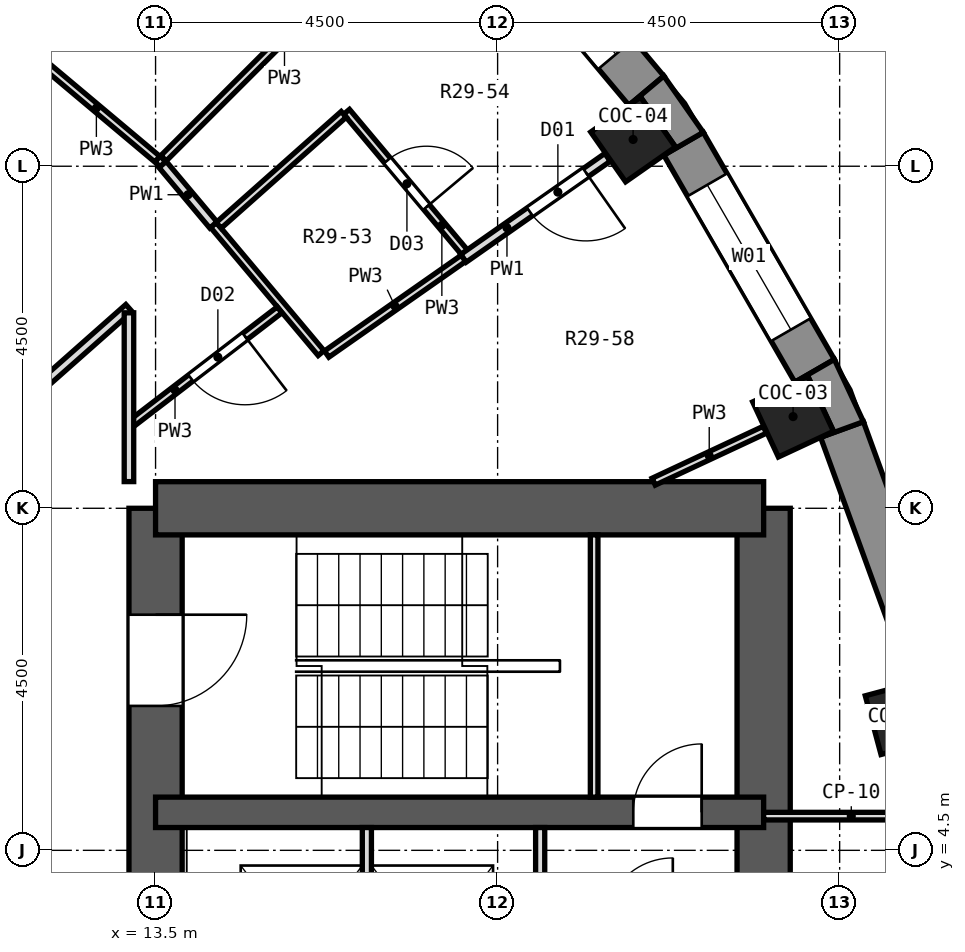
"""IFC4 building model, lengths in metres.
Left out: names, types, materials, properties, quantities, classifications, styles, units other than length and angle.
Written with IfcOpenShell. Run it as: python <this file> out.ifc"""

import sys

from ifc_helpers import new_model, si_unit, direction, frame, frame_2d, origin, origin_2d, place, context, subcontext, project, spatial, polyline, rectangle, outline, extrude, element, fill, save


model = new_model("IFC4")
c1 = context("Model", 3, precision=1e-05, world=origin(), true_north=direction((0.0, 1.0)))
c2 = subcontext(c1, "Body", "Model", "MODEL_VIEW")
j1 = project(units=[si_unit("LENGTHUNIT", "METRE"), si_unit("PLANEANGLEUNIT", "RADIAN")], contexts=[c1])
p1 = place(None, origin())
s1 = spatial("IfcSite", under=j1, at=p1, CompositionType="ELEMENT")
p2 = place(p1, origin())
s2 = spatial("IfcBuilding", under=s1, at=p2, CompositionType="ELEMENT")
p3 = place(p2, frame((0.0, 0.0, 200.4)))
s3 = spatial("IfcBuildingStorey", under=s2, at=p3, CompositionType="ELEMENT", Elevation=200.4)
for number, where, z_axis, x_axis in (
    (1, (23.327, 6.25, 0.0), (0.0, 0.0, 1.0), (0.966, 0.259, 0.0)),
    (2, (21.887, 10.206, 0.0), (0.0, 0.0, 1.0), (0.906, 0.423, 0.0)),
    (3, (19.782, 13.852, 0.0), (0.0, 0.0, 1.0), (0.819, 0.574, 0.0)),
):
    element("IfcColumn", number, at=place(p3, frame(where, z_axis=z_axis, x_axis=x_axis)), inside=s3, PredefinedType="COLUMN", context=c2, shape_type="SweptSolid", body=[
        extrude(rectangle(XDim=0.8, YDim=0.8, at=origin_2d()), origin(), (0.0, 0.0, 1.0), 3.3),
    ])
p4 = place(p3, frame((13.5, -9.0, 0.0), z_axis=(0.0, 0.0, 1.0), x_axis=(0.0, 1.0, 0.0)))
e4 = element("IfcWall", 4, at=p4, inside=s3, PredefinedType="SHEAR", context=c2, shape_type="SweptSolid", body=[
    extrude(rectangle(XDim=18.0, YDim=0.7, at=frame_2d((9.0, 0.0))), origin(), (0.0, 0.0, 1.0), 3.3),
])
p5 = place(p4, frame((15.4, 0.0, 0.0)))
e5 = element("IfcOpeningElement", 5, at=p5, cuts=e4, PredefinedType="OPENING", context=c2, shape_type="SweptSolid", body=[
    extrude(rectangle(XDim=1.2, YDim=2.1, at=frame_2d((0.6, 1.05))), frame((0.0, 0.362, 0.0), z_axis=(0.0, -1.0, 0.0), x_axis=(1.0, 0.0, 0.0)), (0.0, 0.0, 1.0), 0.724),
])
p6 = place(p4, frame((1.4, 0.0, 0.0)))
e6 = element("IfcOpeningElement", 6, at=p6, cuts=e4, PredefinedType="OPENING", context=c2, shape_type="SweptSolid", body=[
    extrude(rectangle(XDim=1.2, YDim=2.1, at=frame_2d((0.6, 1.05))), frame((0.0, 0.362, 0.0), z_axis=(0.0, -1.0, 0.0), x_axis=(1.0, 0.0, 0.0)), (0.0, 0.0, 1.0), 0.724),
])
p7 = place(p4, frame((7.5, 0.0, 0.0)))
e7 = element("IfcOpeningElement", 7, at=p7, cuts=e4, PredefinedType="OPENING", context=c2, shape_type="SweptSolid", body=[
    extrude(rectangle(XDim=3.0, YDim=2.4, at=frame_2d((1.5, 1.2))), frame((0.0, 0.362, 0.0), z_axis=(0.0, -1.0, 0.0), x_axis=(1.0, 0.0, 0.0)), (0.0, 0.0, 1.0), 0.724),
])
p8 = place(p3, frame((21.5, -9.0, 0.0), z_axis=(0.0, 0.0, 1.0), x_axis=(0.0, 1.0, 0.0)))
e8 = element("IfcWall", 8, at=p8, inside=s3, PredefinedType="SHEAR", context=c2, shape_type="SweptSolid", body=[
    extrude(rectangle(XDim=18.0, YDim=0.7, at=frame_2d((9.0, 0.0))), origin(), (0.0, 0.0, 1.0), 3.3),
])
p9 = place(p8, frame((9.45, 0.0, 0.0)))
e9 = element("IfcOpeningElement", 9, at=p9, cuts=e8, PredefinedType="OPENING", context=c2, shape_type="SweptSolid", body=[
    extrude(rectangle(XDim=0.9, YDim=2.1, at=frame_2d((0.45, 1.05))), frame((0.0, 0.362, 0.0), z_axis=(0.0, -1.0, 0.0), x_axis=(1.0, 0.0, 0.0)), (0.0, 0.0, 1.0), 0.724),
])
p10 = place(p8, frame((7.65, 0.0, 0.0)))
e10 = element("IfcOpeningElement", 10, at=p10, cuts=e8, PredefinedType="OPENING", context=c2, shape_type="SweptSolid", body=[
    extrude(rectangle(XDim=0.9, YDim=2.1, at=frame_2d((0.45, 1.05))), frame((0.0, 0.362, 0.0), z_axis=(0.0, -1.0, 0.0), x_axis=(1.0, 0.0, 0.0)), (0.0, 0.0, 1.0), 0.724),
])
p11 = place(p3, frame((13.5, 9.0, 0.0), z_axis=(0.0, 0.0, 1.0), x_axis=(1.0, 0.0, 0.0)))
e11 = element("IfcWall", 11, at=p11, inside=s3, PredefinedType="SHEAR", context=c2, shape_type="SweptSolid", body=[
    extrude(rectangle(XDim=8.0, YDim=0.7, at=frame_2d((4.0, 0.0))), origin(), (0.0, 0.0, 1.0), 3.3),
])
p12 = place(p3, frame((13.5, 5.0, 0.0), z_axis=(0.0, 0.0, 1.0), x_axis=(1.0, 0.0, 0.0)))
e12 = element("IfcWall", 12, at=p12, inside=s3, PredefinedType="SHEAR", context=c2, shape_type="SweptSolid", body=[
    extrude(rectangle(XDim=8.0, YDim=0.4, at=frame_2d((4.0, 0.0))), origin(), (0.0, 0.0, 1.0), 3.3),
])
p13 = place(p12, frame((6.285, 0.0, 0.0)))
e13 = element("IfcOpeningElement", 13, at=p13, cuts=e12, PredefinedType="OPENING", context=c2, shape_type="SweptSolid", body=[
    extrude(rectangle(XDim=0.9, YDim=2.1, at=frame_2d((0.45, 1.05))), frame((0.0, 0.212, 0.0), z_axis=(0.0, -1.0, 0.0), x_axis=(1.0, 0.0, 0.0)), (0.0, 0.0, 1.0), 0.424),
])
p14 = place(p3, frame((23.711, 6.794, 0.0), z_axis=(0.0, 0.0, 1.0), x_axis=(-0.342032843455, 0.93968799822, 0.0)))
e14 = element("IfcWall", 14, at=p14, inside=s3, PredefinedType="SOLIDWALL", context=c2, shape_type="SweptSolid", body=[
    extrude(rectangle(XDim=3.45, YDim=0.6, at=frame_2d((1.725, 0.0))), origin(), (0.0, 0.0, 1.0), 2.85),
])
p15 = place(p3, frame((22.171, 10.809, 0.0), z_axis=(0.0, 0.0, 1.0), x_axis=(-0.499998129301, 0.86602648383, 0.0)))
e15 = element("IfcWall", 15, at=p15, inside=s3, PredefinedType="SOLIDWALL", context=c2, shape_type="SweptSolid", body=[
    extrude(rectangle(XDim=3.45, YDim=0.6, at=frame_2d((1.725, 0.0))), origin(), (0.0, 0.0, 1.0), 2.85),
])
p16 = place(p15, frame((0.625, 0.0, 0.9)))
e16 = element("IfcOpeningElement", 16, at=p16, cuts=e15, PredefinedType="OPENING", context=c2, shape_type="SweptSolid", body=[
    extrude(rectangle(XDim=2.2, YDim=1.8, at=frame_2d((1.1, 0.9))), frame((0.0, 0.312, 0.0), z_axis=(0.0, -1.0, 0.0), x_axis=(1.0, 0.0, 0.0)), (0.0, 0.0, 1.0), 0.624),
])
p17 = place(p3, frame((19.957, 14.494, 0.0), z_axis=(0.0, 0.0, 1.0), x_axis=(-0.642770398358, 0.766058884809, 0.0)))
e17 = element("IfcWall", 17, at=p17, inside=s3, PredefinedType="SOLIDWALL", context=c2, shape_type="SweptSolid", body=[
    extrude(rectangle(XDim=3.449, YDim=0.6, at=frame_2d((1.725, 0.0))), origin(), (0.0, 0.0, 1.0), 2.85),
])
p18 = place(p17, frame((0.625, 0.0, 0.9)))
e18 = element("IfcOpeningElement", 18, at=p18, cuts=e17, PredefinedType="OPENING", context=c2, shape_type="SweptSolid", body=[
    extrude(rectangle(XDim=2.2, YDim=1.8, at=frame_2d((1.1, 0.9))), frame((0.0, 0.312, 0.0), z_axis=(0.0, -1.0, 0.0), x_axis=(1.0, 0.0, 0.0)), (0.0, 0.0, 1.0), 0.624),
])
p19 = place(p3, origin())
e19 = element("IfcWall", 19, at=p19, inside=s3, PredefinedType="SOLIDWALL", context=c2, shape_type="SweptSolid", body=[
    extrude(outline(polyline([(22.431, 10.959), (21.911, 10.659), (22.081, 10.738), (22.419, 10.013), (22.249, 9.934), (22.813, 10.139), (22.431, 10.959)])), origin(), (0.0, 0.0, 1.0), 2.85),
])
p20 = place(p3, origin())
e20 = element("IfcWall", 20, at=p20, inside=s3, PredefinedType="SOLIDWALL", context=c2, shape_type="SweptSolid", body=[
    extrude(outline(polyline([(20.706, 13.946), (20.187, 14.687), (19.727, 14.302), (19.881, 14.409), (20.34, 13.754), (20.186, 13.646), (20.706, 13.946)])), origin(), (0.0, 0.0, 1.0), 2.85),
])
p21 = place(p3, frame((13.528, 13.6, 0.0), z_axis=(0.0, 0.0, 1.0), x_axis=(0.643986628051, -0.765036746106, 0.0)))
e21 = element("IfcWall", 21, at=p21, inside=s3, PredefinedType="PARTITIONING", context=c2, shape_type="SweptSolid", body=[
    extrude(rectangle(XDim=0.101, YDim=0.1, at=frame_2d((0.05, 0.0))), origin(), (0.0, 0.0, 1.0), 2.85),
])
p22 = place(p3, frame((14.261, 12.728, 0.0), z_axis=(0.0, 0.0, 1.0), x_axis=(0.643254486379, -0.76565244449, 0.0)))
e22 = element("IfcWall", 22, at=p22, inside=s3, PredefinedType="PARTITIONING", context=c2, shape_type="SweptSolid", body=[
    extrude(rectangle(XDim=2.202, YDim=0.1, at=frame_2d((1.101, 0.0))), origin(), (0.0, 0.0, 1.0), 2.85),
])
p23 = place(p3, frame((13.593, 13.523, 0.0), z_axis=(0.0, 0.0, 1.0), x_axis=(0.642817053057, -0.766019736233, 0.0)))
e23 = element("IfcWall", 23, at=p23, inside=s3, PredefinedType="PARTITIONING", context=c2, shape_type="SweptSolid", body=[
    extrude(rectangle(XDim=1.038, YDim=0.125, at=frame_2d((0.519, 0.0))), origin(), (0.0, 0.0, 1.0), 2.85),
])
p24 = place(p3, frame((16.013, 14.216, 0.0), z_axis=(0.0, 0.0, 1.0), x_axis=(0.642879705086, -0.765967156468, 0.0)))
e24 = element("IfcWall", 24, at=p24, inside=s3, PredefinedType="PARTITIONING", context=c2, shape_type="SweptSolid", body=[
    extrude(rectangle(XDim=2.42, YDim=0.1, at=frame_2d((1.21, 0.0))), origin(), (0.0, 0.0, 1.0), 2.85),
])
p25 = place(p24, frame((0.835, 0.0, 0.0)))
e25 = element("IfcOpeningElement", 25, at=p25, cuts=e24, PredefinedType="OPENING", context=c2, shape_type="SweptSolid", body=[
    extrude(rectangle(XDim=0.8, YDim=2.1, at=frame_2d((0.4, 1.05))), frame((0.0, 0.062, 0.0), z_axis=(0.0, -1.0, 0.0), x_axis=(1.0, 0.0, 0.0)), (0.0, 0.0, 1.0), 0.124),
])
p26 = place(p3, frame((11.92, 14.938, 0.0), z_axis=(0.0, 0.0, 1.0), x_axis=(0.766132236748, -0.6426829668, 0.0)))
e26 = element("IfcWall", 26, at=p26, inside=s3, PredefinedType="PARTITIONING", context=c2, shape_type="SweptSolid", body=[
    extrude(rectangle(XDim=2.092, YDim=0.1, at=frame_2d((1.046, 0.0))), origin(), (0.0, 0.0, 1.0), 2.85),
])
p27 = place(p3, frame((20.053, 9.35, 0.0), z_axis=(0.0, 0.0, 1.0), x_axis=(0.906055596822, 0.423158664648, 0.0)))
e27 = element("IfcWall", 27, at=p27, inside=s3, PredefinedType="PARTITIONING", context=c2, shape_type="SweptSolid", body=[
    extrude(rectangle(XDim=1.614, YDim=0.1, at=frame_2d((0.807, 0.0))), origin(), (0.0, 0.0, 1.0), 2.85),
])
p28 = place(p3, frame((17.55, 12.288, 0.0), z_axis=(0.0, 0.0, 1.0), x_axis=(0.818914823112, 0.573915074282, 0.0)))
e28 = element("IfcWall", 28, at=p28, inside=s3, PredefinedType="PARTITIONING", context=c2, shape_type="SweptSolid", body=[
    extrude(rectangle(XDim=2.316, YDim=0.125, at=frame_2d((1.158, 0.0))), origin(), (0.0, 0.0, 1.0), 2.85),
])
p29 = place(p28, frame((1.068, 0.0, 0.0)))
e29 = element("IfcOpeningElement", 29, at=p29, cuts=e28, PredefinedType="OPENING", context=c2, shape_type="SweptSolid", body=[
    extrude(rectangle(XDim=0.9, YDim=2.1, at=frame_2d((0.45, 1.05))), frame((0.0, 0.074, 0.0), z_axis=(0.0, -1.0, 0.0), x_axis=(1.0, 0.0, 0.0)), (0.0, 0.0, 1.0), 0.149),
])
p30 = place(p3, frame((15.751, 11.029, 0.0), z_axis=(0.0, 0.0, 1.0), x_axis=(0.819158790137, 0.573566802161, 0.0)))
e30 = element("IfcWall", 30, at=p30, inside=s3, PredefinedType="PARTITIONING", context=c2, shape_type="SweptSolid", body=[
    extrude(rectangle(XDim=2.196, YDim=0.1, at=frame_2d((1.098, 0.0))), origin(), (0.0, 0.0, 1.0), 2.85),
])
p31 = place(p3, frame((13.2, 10.129, 0.0), z_axis=(0.0, 0.0, 1.0), x_axis=(0.793343125349, 0.608774741149, 0.0)))
e31 = element("IfcWall", 31, at=p31, inside=s3, PredefinedType="PARTITIONING", context=c2, shape_type="SweptSolid", body=[
    extrude(rectangle(XDim=2.434, YDim=0.1, at=frame_2d((1.217, 0.0))), origin(), (0.0, 0.0, 1.0), 2.85),
])
p32 = place(p31, frame((0.961, 0.0, 0.0)))
e32 = element("IfcOpeningElement", 32, at=p32, cuts=e31, PredefinedType="OPENING", context=c2, shape_type="SweptSolid", body=[
    extrude(rectangle(XDim=0.9, YDim=2.1, at=frame_2d((0.45, 1.05))), frame((0.0, 0.062, 0.0), z_axis=(0.0, -1.0, 0.0), x_axis=(1.0, 0.0, 0.0)), (0.0, 0.0, 1.0), 0.124),
])
p33 = place(p3, frame((6.42, 5.68, 0.0), z_axis=(0.0, 0.0, 1.0), x_axis=(0.748960259926, 0.662614917619, 0.0)))
e33 = element("IfcWall", 33, at=p33, inside=s3, PredefinedType="PARTITIONING", context=c2, shape_type="SweptSolid", body=[
    extrude(rectangle(XDim=8.986, YDim=0.125, at=frame_2d((4.493, 0.0))), origin(), (0.0, 0.0, 1.0), 2.85),
])
p34 = place(p3, frame((14.33, 12.722, 0.0), z_axis=(0.0, 0.0, 1.0), x_axis=(0.747807135499, 0.663916024883, 0.0)))
e34 = element("IfcWall", 34, at=p34, inside=s3, PredefinedType="PARTITIONING", context=c2, shape_type="SweptSolid", body=[
    extrude(rectangle(XDim=2.2, YDim=0.1, at=frame_2d((1.1, 0.0))), origin(), (0.0, 0.0, 1.0), 2.85),
])
p35 = place(p3, frame((13.605, 13.605, 0.0), z_axis=(0.0, 0.0, 1.0), x_axis=(0.707106781187, 0.707106781187, 0.0)))
e35 = element("IfcWall", 35, at=p35, inside=s3, PredefinedType="PARTITIONING", context=c2, shape_type="SweptSolid", body=[
    extrude(rectangle(XDim=4.499, YDim=0.1, at=frame_2d((2.25, 0.0))), origin(), (0.0, 0.0, 1.0), 2.85),
])
p36 = place(p3, frame((13.15, 9.351, 0.0), z_axis=(0.0, 0.0, 1.0), x_axis=(0.0, 1.0, 0.0)))
e36 = element("IfcWall", 36, at=p36, inside=s3, PredefinedType="PARTITIONING", context=c2, shape_type="SweptSolid", body=[
    extrude(rectangle(XDim=2.22, YDim=0.125, at=frame_2d((1.11, 0.0))), origin(), (0.0, 0.0, 1.0), 2.85),
])
p37 = place(p3, frame((21.5, 4.95, 0.0), z_axis=(0.0, 0.0, 1.0), x_axis=(1.0, 0.0, 0.0)))
e37 = element("IfcWall", 37, at=p37, inside=s3, PredefinedType="PARTITIONING", context=c2, shape_type="SweptSolid", body=[
    extrude(rectangle(XDim=2.307, YDim=0.1, at=frame_2d((1.153, 0.0))), origin(), (0.0, 0.0, 1.0), 2.85),
])
for number, where, z_axis, x_axis in (
    (38, (16.28, 2.2, 0.0), (0.0, 0.0, 1.0), (0.0, 1.0, 0.0)),
    (39, (18.56, 2.2, 0.0), (0.0, 0.0, 1.0), (0.0, 1.0, 0.0)),
):
    element("IfcWall", number, at=place(p3, frame(where, z_axis=z_axis, x_axis=x_axis)), inside=s3, PredefinedType="PARTITIONING", context=c2, shape_type="SweptSolid", body=[
        extrude(rectangle(XDim=2.6, YDim=0.12, at=frame_2d((1.3, 0.0))), origin(), (0.0, 0.0, 1.0), 2.85),
    ])
p38 = place(p3, frame((19.27, 5.2, 0.0), z_axis=(0.0, 0.0, 1.0), x_axis=(0.0, 1.0, 0.0)))
e40 = element("IfcWall", 40, at=p38, inside=s3, PredefinedType="PARTITIONING", context=c2, shape_type="SweptSolid", body=[
    extrude(rectangle(XDim=3.45, YDim=0.1, at=frame_2d((1.725, 0.0))), origin(), (0.0, 0.0, 1.0), 2.85),
])
p39 = place(p16, origin())
e41 = element("IfcWindow", 41, at=p39, inside=s3, PartitioningType="SINGLE_PANEL", PredefinedType="WINDOW", context=c2, shape_type="SweptSolid", body=[
    extrude(rectangle(XDim=2.2, YDim=1.8, at=frame_2d((1.1, 0.9))), frame((0.0, 0.18, 0.0), z_axis=(0.0, -1.0, 0.0), x_axis=(1.0, 0.0, 0.0)), (0.0, 0.0, 1.0), 0.06),
])
fill(e16, e41)
p40 = place(p18, origin())
e42 = element("IfcWindow", 42, at=p40, inside=s3, PartitioningType="SINGLE_PANEL", PredefinedType="WINDOW", context=c2, shape_type="SweptSolid", body=[
    extrude(rectangle(XDim=2.2, YDim=1.8, at=frame_2d((1.1, 0.9))), frame((0.0, 0.18, 0.0), z_axis=(0.0, -1.0, 0.0), x_axis=(1.0, 0.0, 0.0)), (0.0, 0.0, 1.0), 0.06),
])
fill(e18, e42)
p41 = place(p29, frame((0.9, 0.0, 0.0), z_axis=(0.0, 0.0, 1.0), x_axis=(-1.0, 0.0, 0.0)))
e43 = element("IfcDoor", 43, at=p41, inside=s3, OperationType="SINGLE_SWING_LEFT", PredefinedType="DOOR", context=c2, shape_type="SweptSolid", body=[
    extrude(rectangle(XDim=0.9, YDim=2.1, at=frame_2d((0.45, 1.05))), frame((0.0, 0.025, 0.0), z_axis=(0.0, -1.0, 0.0), x_axis=(1.0, 0.0, 0.0)), (0.0, 0.0, 1.0), 0.05),
])
fill(e29, e43)
p42 = place(p32, frame((0.9, 0.0, 0.0), z_axis=(0.0, 0.0, 1.0), x_axis=(-1.0, 0.0, 0.0)))
e44 = element("IfcDoor", 44, at=p42, inside=s3, OperationType="SINGLE_SWING_LEFT", PredefinedType="DOOR", context=c2, shape_type="SweptSolid", body=[
    extrude(rectangle(XDim=0.9, YDim=2.1, at=frame_2d((0.45, 1.05))), frame((0.0, 0.025, 0.0), z_axis=(0.0, -1.0, 0.0), x_axis=(1.0, 0.0, 0.0)), (0.0, 0.0, 1.0), 0.05),
])
fill(e32, e44)
p43 = place(p25, origin())
e45 = element("IfcDoor", 45, at=p43, inside=s3, OperationType="SINGLE_SWING_RIGHT", PredefinedType="DOOR", context=c2, shape_type="SweptSolid", body=[
    extrude(rectangle(XDim=0.8, YDim=2.1, at=frame_2d((0.4, 1.05))), frame((0.0, 0.025, 0.0), z_axis=(0.0, -1.0, 0.0), x_axis=(1.0, 0.0, 0.0)), (0.0, 0.0, 1.0), 0.05),
])
fill(e25, e45)
p44 = place(p13, origin())
e46 = element("IfcDoor", 46, at=p44, inside=s3, OperationType="SINGLE_SWING_RIGHT", PredefinedType="DOOR", context=c2, shape_type="SweptSolid", body=[
    extrude(rectangle(XDim=0.9, YDim=2.1, at=frame_2d((0.45, 1.05))), frame((0.0, 0.025, 0.0), z_axis=(0.0, -1.0, 0.0), x_axis=(1.0, 0.0, 0.0)), (0.0, 0.0, 1.0), 0.05),
])
fill(e13, e46)
p45 = place(p5, frame((1.2, 0.0, 0.0), z_axis=(0.0, 0.0, 1.0), x_axis=(-1.0, 0.0, 0.0)))
e47 = element("IfcDoor", 47, at=p45, inside=s3, OperationType="SINGLE_SWING_LEFT", PredefinedType="DOOR", context=c2, shape_type="SweptSolid", body=[
    extrude(rectangle(XDim=1.2, YDim=2.1, at=frame_2d((0.6, 1.05))), frame((0.0, 0.025, 0.0), z_axis=(0.0, -1.0, 0.0), x_axis=(1.0, 0.0, 0.0)), (0.0, 0.0, 1.0), 0.05),
])
fill(e5, e47)
save(model, sys.argv[1])
